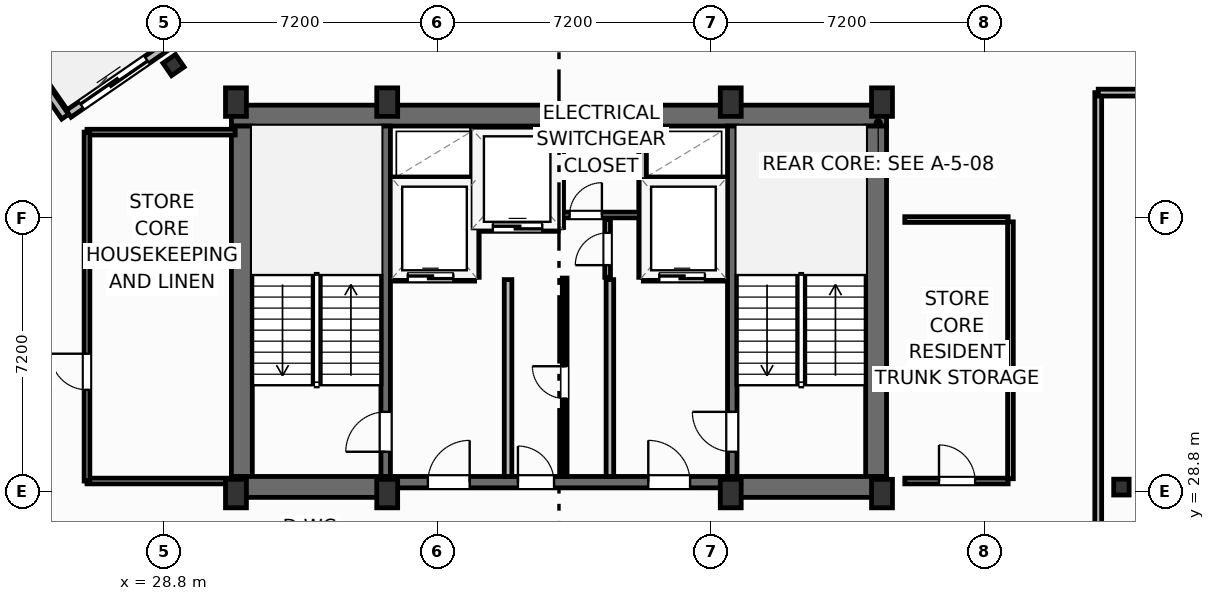
"""IFC4 building model, lengths in metres.
Left out: names, types, materials, properties, quantities, classifications, styles, units other than length and angle.
Written with IfcOpenShell. Run it as: python <this file> out.ifc"""

import sys

from ifc_helpers import new_model, si_unit, direction, frame, frame_2d, origin, origin_2d, place, context, subcontext, project, spatial, rectangle, i_section, extrude, element, fill, save


model = new_model("IFC4")
c1 = context("Model", 3, precision=1e-05, world=origin(), true_north=direction((0.0, 1.0)))
c2 = subcontext(c1, "Body", "Model", "MODEL_VIEW")
j1 = project(units=[si_unit("LENGTHUNIT", "METRE"), si_unit("PLANEANGLEUNIT", "RADIAN")], contexts=[c1])
p1 = place(None, origin())
s1 = spatial("IfcSite", under=j1, at=p1, CompositionType="ELEMENT")
p2 = place(p1, origin())
s2 = spatial("IfcBuilding", under=s1, at=p2, CompositionType="ELEMENT")
p3 = place(p2, frame((0.0, 0.0, 265.6)))
s3 = spatial("IfcBuildingStorey", under=s2, at=p3, CompositionType="ELEMENT", Elevation=265.6)
for number, where, z_axis, x_axis in (
    (1, (30.7, 28.75, 0.0), (0.0, 0.0, 1.0), (1.0, 0.0, 0.0)),
    (2, (34.68, 28.75, 0.0), (0.0, 0.0, 1.0), (1.0, 0.0, 0.0)),
    (3, (43.72, 28.75, 0.0), (0.0, 0.0, 1.0), (1.0, 0.0, 0.0)),
    (4, (47.7, 28.75, 0.0), (0.0, 0.0, 1.0), (1.0, 0.0, 0.0)),
    (5, (30.7, 39.05, 0.0), (0.0, 0.0, 1.0), (1.0, 0.0, 0.0)),
    (6, (34.68, 39.05, 0.0), (0.0, 0.0, 1.0), (1.0, 0.0, 0.0)),
    (7, (43.72, 39.05, 0.0), (0.0, 0.0, 1.0), (1.0, 0.0, 0.0)),
    (8, (47.7, 39.05, 0.0), (0.0, 0.0, 1.0), (1.0, 0.0, 0.0)),
):
    element("IfcColumn", number, at=place(p3, frame(where, z_axis=z_axis, x_axis=x_axis)), inside=s3, PredefinedType="COLUMN", context=c2, shape_type="SweptSolid", body=[
        extrude(rectangle(XDim=0.55, YDim=0.75, at=origin_2d()), origin(), (0.0, 0.0, 1.0), 3.7),
    ])
p4 = place(p3, frame((54.0, 28.92, 0.0), z_axis=(0.0, 0.0, 1.0), x_axis=(1.0, 0.0, 0.0)))
e9 = element("IfcColumn", 9, at=p4, inside=s3, PredefinedType="COLUMN", context=c2, shape_type="SweptSolid", body=[
    extrude(i_section(OverallWidth=0.406, OverallDepth=0.416, WebThickness=0.03, FlangeThickness=0.048, FilletRadius=0.025, at=origin_2d()), origin(), (0.0, 0.0, 1.0), 3.7),
])
p5 = place(p3, frame((30.58, 38.695, 0.0), z_axis=(0.0, 0.0, 1.0), x_axis=(1.0, 0.0, 0.0)))
e10 = element("IfcWall", 10, at=p5, inside=s3, PredefinedType="SHEAR", context=c2, shape_type="SweptSolid", body=[
    extrude(rectangle(XDim=17.24, YDim=0.55, at=frame_2d((8.62, 0.0))), origin(), (0.0, 0.0, 1.0), 3.45),
])
for number, where, z_axis, x_axis in (
    (11, (30.855, 29.2, 0.0), (0.0, 0.0, 1.0), (0.0, 1.0, 0.0)),
    (12, (47.545, 29.2, 0.0), (0.0, 0.0, 1.0), (0.0, 1.0, 0.0)),
):
    element("IfcWall", number, at=place(p3, frame(where, z_axis=z_axis, x_axis=x_axis)), inside=s3, PredefinedType="SHEAR", context=c2, shape_type="SweptSolid", body=[
        extrude(rectangle(XDim=9.22, YDim=0.55, at=frame_2d((4.61, 0.0))), origin(), (0.0, 0.0, 1.0), 3.45),
    ])
for number, where, z_axis, x_axis in (
    (13, (30.58, 28.925, 0.0), (0.0, 0.0, 1.0), (1.0, 0.0, 0.0)),
    (14, (43.6, 28.925, 0.0), (0.0, 0.0, 1.0), (1.0, 0.0, 0.0)),
):
    element("IfcWall", number, at=place(p3, frame(where, z_axis=z_axis, x_axis=x_axis)), inside=s3, PredefinedType="SHEAR", context=c2, shape_type="SweptSolid", body=[
        extrude(rectangle(XDim=4.22, YDim=0.55, at=frame_2d((2.11, 0.0))), origin(), (0.0, 0.0, 1.0), 3.45),
    ])
p6 = place(p3, frame((34.8, 29.05, 0.0), z_axis=(0.0, 0.0, 1.0), x_axis=(1.0, 0.0, 0.0)))
e15 = element("IfcWall", 15, at=p6, inside=s3, PredefinedType="SHEAR", context=c2, shape_type="SweptSolid", body=[
    extrude(rectangle(XDim=8.8, YDim=0.3, at=frame_2d((4.4, 0.0))), origin(), (0.0, 0.0, 1.0), 3.45),
])
p7 = place(p6, frame((0.95, 0.0, 0.0)))
e16 = element("IfcOpeningElement", 16, at=p7, cuts=e15, PredefinedType="OPENING", context=c2, shape_type="SweptSolid", body=[
    extrude(rectangle(XDim=1.1, YDim=2.15, at=frame_2d((0.55, 1.075))), frame((0.0, 0.16, 0.0), z_axis=(0.0, -1.0, 0.0), x_axis=(1.0, 0.0, 0.0)), (0.0, 0.0, 1.0), 0.32),
])
p8 = place(p6, frame((6.75, 0.0, 0.0)))
e17 = element("IfcOpeningElement", 17, at=p8, cuts=e15, PredefinedType="OPENING", context=c2, shape_type="SweptSolid", body=[
    extrude(rectangle(XDim=1.1, YDim=2.15, at=frame_2d((0.55, 1.075))), frame((0.0, 0.16, 0.0), z_axis=(0.0, -1.0, 0.0), x_axis=(1.0, 0.0, 0.0)), (0.0, 0.0, 1.0), 0.32),
])
p9 = place(p6, frame((3.32, 0.0, 0.0)))
e18 = element("IfcOpeningElement", 18, at=p9, cuts=e15, PredefinedType="OPENING", context=c2, shape_type="SweptSolid", body=[
    extrude(rectangle(XDim=0.95, YDim=2.15, at=frame_2d((0.475, 1.075))), frame((0.0, 0.16, 0.0), z_axis=(0.0, -1.0, 0.0), x_axis=(1.0, 0.0, 0.0)), (0.0, 0.0, 1.0), 0.32),
])
p10 = place(p3, frame((34.64, 29.2, 0.0), z_axis=(0.0, 0.0, 1.0), x_axis=(0.0, 1.0, 0.0)))
e19 = element("IfcWall", 19, at=p10, inside=s3, PredefinedType="SHEAR", context=c2, shape_type="SweptSolid", body=[
    extrude(rectangle(XDim=9.22, YDim=0.25, at=frame_2d((4.61, 0.0))), origin(), (0.0, 0.0, 1.0), 3.45),
])
p11 = place(p10, frame((0.65, 0.0, 0.0)))
e20 = element("IfcOpeningElement", 20, at=p11, cuts=e19, PredefinedType="OPENING", context=c2, shape_type="SweptSolid", body=[
    extrude(rectangle(XDim=1.05, YDim=2.15, at=frame_2d((0.525, 1.075))), frame((0.0, 0.135, 0.0), z_axis=(0.0, -1.0, 0.0), x_axis=(1.0, 0.0, 0.0)), (0.0, 0.0, 1.0), 0.27),
])
p12 = place(p3, frame((43.76, 29.2, 0.0), z_axis=(0.0, 0.0, 1.0), x_axis=(0.0, 1.0, 0.0)))
e21 = element("IfcWall", 21, at=p12, inside=s3, PredefinedType="SHEAR", context=c2, shape_type="SweptSolid", body=[
    extrude(rectangle(XDim=9.22, YDim=0.25, at=frame_2d((4.61, 0.0))), origin(), (0.0, 0.0, 1.0), 3.45),
])
p13 = place(p12, frame((0.65, 0.0, 0.0)))
e22 = element("IfcOpeningElement", 22, at=p13, cuts=e21, PredefinedType="OPENING", context=c2, shape_type="SweptSolid", body=[
    extrude(rectangle(XDim=1.05, YDim=2.15, at=frame_2d((0.525, 1.075))), frame((0.0, 0.135, 0.0), z_axis=(0.0, -1.0, 0.0), x_axis=(1.0, 0.0, 0.0)), (0.0, 0.0, 1.0), 0.27),
])
p14 = place(p3, frame((29.057, 40.025, 0.0), z_axis=(0.0, 0.0, 1.0), x_axis=(0.823532597628, 0.567268949127, 0.0)))
e23 = element("IfcColumn", 23, at=p14, inside=s3, PredefinedType="COLUMN", context=c2, shape_type="SweptSolid", body=[
    extrude(i_section(OverallWidth=0.401, OverallDepth=0.399, WebThickness=0.025, FlangeThickness=0.04, FilletRadius=0.022, at=origin_2d()), origin(), (0.0, 0.0, 1.0), 3.7),
])
p15 = place(p3, frame((26.297, 38.743, 0.0), z_axis=(0.0, 0.0, 1.0), x_axis=(0.823534636215, 0.567265989598, 0.0)))
e24 = element("IfcWall", 24, at=p15, inside=s3, PredefinedType="SOLIDWALL", context=c2, shape_type="SweptSolid", body=[
    extrude(rectangle(XDim=6.0, YDim=0.22, at=frame_2d((3.0, 0.0))), origin(), (0.0, 0.0, 1.0), 2.73),
])
p16 = place(p15, frame((0.4, 0.0, 0.0)))
e25 = element("IfcOpeningElement", 25, at=p16, cuts=e24, PredefinedType="OPENING", context=c2, shape_type="SweptSolid", body=[
    extrude(rectangle(XDim=2.1, YDim=2.3, at=frame_2d((1.05, 1.15))), frame((0.0, 0.12, 0.0), z_axis=(0.0, -1.0, 0.0), x_axis=(1.0, 0.0, 0.0)), (0.0, 0.0, 1.0), 0.24),
])
p17 = place(p3, frame((26.204, 38.667, 0.0), z_axis=(0.0, 0.0, 1.0), x_axis=(-0.567219383419, 0.823566737474, 0.0)))
e26 = element("IfcWall", 26, at=p17, inside=s3, PredefinedType="SOLIDWALL", context=c2, shape_type="SweptSolid", body=[
    extrude(rectangle(XDim=2.1, YDim=0.22, at=frame_2d((1.05, 0.0))), origin(), (0.0, 0.0, 1.0), 2.73),
])
p18 = place(p3, frame((53.39, 19.24, 0.0), z_axis=(0.0, 0.0, 1.0), x_axis=(0.0, 1.0, 0.0)))
e27 = element("IfcWall", 27, at=p18, inside=s3, PredefinedType="PARTITIONING", context=c2, shape_type="SweptSolid", body=[
    extrude(rectangle(XDim=20.06, YDim=0.18, at=frame_2d((10.03, 0.0))), origin(), (0.0, 0.0, 1.0), 3.45),
])
p19 = place(p18, frame((7.7, 0.0, 0.0)))
e28 = element("IfcOpeningElement", 28, at=p19, cuts=e27, PredefinedType="OPENING", context=c2, shape_type="SweptSolid", body=[
    extrude(rectangle(XDim=0.95, YDim=2.05, at=frame_2d((0.475, 1.025))), frame((0.0, 0.1, 0.0), z_axis=(0.0, -1.0, 0.0), x_axis=(1.0, 0.0, 0.0)), (0.0, 0.0, 1.0), 0.2),
])
p20 = place(p3, frame((53.39, 39.3, 0.0), z_axis=(0.0, 0.0, 1.0), x_axis=(1.0, 0.0, 0.0)))
e29 = element("IfcWall", 29, at=p20, inside=s3, PredefinedType="PARTITIONING", context=c2, shape_type="SweptSolid", body=[
    extrude(rectangle(XDim=16.149, YDim=0.18, at=frame_2d((8.075, 0.0))), origin(), (0.0, 0.0, 1.0), 2.739),
])
for number, where, z_axis, x_axis in (
    (30, (37.86, 29.2, 0.0), (0.0, 0.0, 1.0), (0.0, 1.0, 0.0)),
    (31, (40.54, 29.2, 0.0), (0.0, 0.0, 1.0), (0.0, 1.0, 0.0)),
):
    element("IfcWall", number, at=place(p3, frame(where, z_axis=z_axis, x_axis=x_axis)), inside=s3, PredefinedType="PARTITIONING", context=c2, shape_type="SweptSolid", body=[
        extrude(rectangle(XDim=5.18, YDim=0.2, at=frame_2d((2.59, 0.0))), origin(), (0.0, 0.0, 1.0), 3.45),
    ])
p21 = place(p3, frame((34.8, 34.44, 0.0), z_axis=(0.0, 0.0, 1.0), x_axis=(1.0, 0.0, 0.0)))
e32 = element("IfcWall", 32, at=p21, inside=s3, PredefinedType="PARTITIONING", context=c2, shape_type="SweptSolid", body=[
    extrude(rectangle(XDim=2.18, YDim=0.2, at=frame_2d((1.09, 0.0))), origin(), (0.0, 0.0, 1.0), 3.45),
])
p22 = place(p21, frame((0.42, 0.0, 0.0)))
e33 = element("IfcOpeningElement", 33, at=p22, cuts=e32, PredefinedType="OPENING", context=c2, shape_type="SweptSolid", body=[
    extrude(rectangle(XDim=1.2, YDim=2.2, at=frame_2d((0.6, 1.1))), frame((0.0, 0.11, 0.0), z_axis=(0.0, -1.0, 0.0), x_axis=(1.0, 0.0, 0.0)), (0.0, 0.0, 1.0), 0.22),
])
p23 = place(p3, frame((34.8, 36.98, 0.0), z_axis=(0.0, 0.0, 1.0), x_axis=(1.0, 0.0, 0.0)))
e34 = element("IfcWall", 34, at=p23, inside=s3, PredefinedType="PARTITIONING", context=c2, shape_type="SweptSolid", body=[
    extrude(rectangle(XDim=2.18, YDim=0.2, at=frame_2d((1.09, 0.0))), origin(), (0.0, 0.0, 1.0), 3.45),
])
p24 = place(p3, frame((37.0, 34.44, 0.0), z_axis=(0.0, 0.0, 1.0), x_axis=(0.0, 1.0, 0.0)))
e35 = element("IfcWall", 35, at=p24, inside=s3, PredefinedType="PARTITIONING", context=c2, shape_type="SweptSolid", body=[
    extrude(rectangle(XDim=3.9, YDim=0.2, at=frame_2d((1.95, 0.0))), origin(), (0.0, 0.0, 1.0), 3.45),
])
p25 = place(p3, frame((41.42, 34.44, 0.0), z_axis=(0.0, 0.0, 1.0), x_axis=(1.0, 0.0, 0.0)))
e36 = element("IfcWall", 36, at=p25, inside=s3, PredefinedType="PARTITIONING", context=c2, shape_type="SweptSolid", body=[
    extrude(rectangle(XDim=2.18, YDim=0.2, at=frame_2d((1.09, 0.0))), origin(), (0.0, 0.0, 1.0), 3.45),
])
p26 = place(p25, frame((0.42, 0.0, 0.0)))
e37 = element("IfcOpeningElement", 37, at=p26, cuts=e36, PredefinedType="OPENING", context=c2, shape_type="SweptSolid", body=[
    extrude(rectangle(XDim=1.2, YDim=2.2, at=frame_2d((0.6, 1.1))), frame((0.0, 0.11, 0.0), z_axis=(0.0, -1.0, 0.0), x_axis=(1.0, 0.0, 0.0)), (0.0, 0.0, 1.0), 0.22),
])
p27 = place(p3, frame((41.42, 36.98, 0.0), z_axis=(0.0, 0.0, 1.0), x_axis=(1.0, 0.0, 0.0)))
e38 = element("IfcWall", 38, at=p27, inside=s3, PredefinedType="PARTITIONING", context=c2, shape_type="SweptSolid", body=[
    extrude(rectangle(XDim=2.18, YDim=0.2, at=frame_2d((1.09, 0.0))), origin(), (0.0, 0.0, 1.0), 3.45),
])
p28 = place(p3, frame((41.4, 34.44, 0.0), z_axis=(0.0, 0.0, 1.0), x_axis=(0.0, 1.0, 0.0)))
e39 = element("IfcWall", 39, at=p28, inside=s3, PredefinedType="PARTITIONING", context=c2, shape_type="SweptSolid", body=[
    extrude(rectangle(XDim=3.9, YDim=0.2, at=frame_2d((1.95, 0.0))), origin(), (0.0, 0.0, 1.0), 3.45),
])
p29 = place(p3, frame((37.06, 35.75, 0.0), z_axis=(0.0, 0.0, 1.0), x_axis=(1.0, 0.0, 0.0)))
e40 = element("IfcWall", 40, at=p29, inside=s3, PredefinedType="PARTITIONING", context=c2, shape_type="SweptSolid", body=[
    extrude(rectangle(XDim=2.12, YDim=0.2, at=frame_2d((1.06, 0.0))), origin(), (0.0, 0.0, 1.0), 3.45),
])
p30 = place(p29, frame((0.4, 0.0, 0.0)))
e41 = element("IfcOpeningElement", 41, at=p30, cuts=e40, PredefinedType="OPENING", context=c2, shape_type="SweptSolid", body=[
    extrude(rectangle(XDim=1.3, YDim=2.2, at=frame_2d((0.65, 1.1))), frame((0.0, 0.11, 0.0), z_axis=(0.0, -1.0, 0.0), x_axis=(1.0, 0.0, 0.0)), (0.0, 0.0, 1.0), 0.22),
])
p31 = place(p3, frame((39.22, 35.75, 0.0), z_axis=(0.0, 0.0, 1.0), x_axis=(0.0, 1.0, 0.0)))
e42 = element("IfcWall", 42, at=p31, inside=s3, PredefinedType="PARTITIONING", context=c2, shape_type="SweptSolid", body=[
    extrude(rectangle(XDim=2.59, YDim=0.2, at=frame_2d((1.295, 0.0))), origin(), (0.0, 0.0, 1.0), 3.45),
])
p32 = place(p3, frame((39.3, 36.08, 0.0), z_axis=(0.0, 0.0, 1.0), x_axis=(1.0, 0.0, 0.0)))
e43 = element("IfcWall", 43, at=p32, inside=s3, PredefinedType="PARTITIONING", context=c2, shape_type="SweptSolid", body=[
    extrude(rectangle(XDim=2.02, YDim=0.15, at=frame_2d((1.01, 0.0))), origin(), (0.0, 0.0, 1.0), 3.45),
])
p33 = place(p32, frame((0.18, 0.0, 0.0)))
e44 = element("IfcOpeningElement", 44, at=p33, cuts=e43, PredefinedType="OPENING", context=c2, shape_type="SweptSolid", body=[
    extrude(rectangle(XDim=0.85, YDim=2.05, at=frame_2d((0.425, 1.025))), frame((0.0, 0.085, 0.0), z_axis=(0.0, -1.0, 0.0), x_axis=(1.0, 0.0, 0.0)), (0.0, 0.0, 1.0), 0.17),
])
p34 = place(p3, frame((40.48, 34.44, 0.0), z_axis=(0.0, 0.0, 1.0), x_axis=(0.0, 1.0, 0.0)))
e45 = element("IfcWall", 45, at=p34, inside=s3, PredefinedType="PARTITIONING", context=c2, shape_type="SweptSolid", body=[
    extrude(rectangle(XDim=1.52, YDim=0.15, at=frame_2d((0.76, 0.0))), origin(), (0.0, 0.0, 1.0), 3.45),
])
p35 = place(p34, frame((0.32, 0.0, 0.0)))
e46 = element("IfcOpeningElement", 46, at=p35, cuts=e45, PredefinedType="OPENING", context=c2, shape_type="SweptSolid", body=[
    extrude(rectangle(XDim=0.85, YDim=2.05, at=frame_2d((0.425, 1.025))), frame((0.0, 0.085, 0.0), z_axis=(0.0, -1.0, 0.0), x_axis=(1.0, 0.0, 0.0)), (0.0, 0.0, 1.0), 0.17),
])
p36 = place(p3, frame((39.35, 29.2, 0.0), z_axis=(0.0, 0.0, 1.0), x_axis=(0.0, 1.0, 0.0)))
e47 = element("IfcWall", 47, at=p36, inside=s3, PredefinedType="PARTITIONING", context=c2, shape_type="SweptSolid", body=[
    extrude(rectangle(XDim=5.22, YDim=0.125, at=frame_2d((2.61, 0.0))), origin(), (0.0, 0.0, 1.0), 3.45),
])
p37 = place(p36, frame((2.05, 0.0, 0.0)))
e48 = element("IfcOpeningElement", 48, at=p37, cuts=e47, PredefinedType="OPENING", context=c2, shape_type="SweptSolid", body=[
    extrude(rectangle(XDim=0.85, YDim=2.05, at=frame_2d((0.425, 1.025))), frame((0.0, 0.073, 0.0), z_axis=(0.0, -1.0, 0.0), x_axis=(1.0, 0.0, 0.0)), (0.0, 0.0, 1.0), 0.145),
])
p38 = place(p3, frame((26.78, 29.08, 0.0), z_axis=(0.0, 0.0, 1.0), x_axis=(1.0, 0.0, 0.0)))
e49 = element("IfcWall", 49, at=p38, inside=s3, PredefinedType="PARTITIONING", context=c2, shape_type="SweptSolid", body=[
    extrude(rectangle(XDim=3.8, YDim=0.15, at=frame_2d((1.9, 0.0))), origin(), (0.0, 0.0, 1.0), 3.45),
])
p39 = place(p3, frame((26.78, 38.26, 0.0), z_axis=(0.0, 0.0, 1.0), x_axis=(1.0, 0.0, 0.0)))
e50 = element("IfcWall", 50, at=p39, inside=s3, PredefinedType="PARTITIONING", context=c2, shape_type="SweptSolid", body=[
    extrude(rectangle(XDim=3.9, YDim=0.15, at=frame_2d((1.95, 0.0))), origin(), (0.0, 0.0, 1.0), 3.45),
])
p40 = place(p3, frame((26.78, 29.08, 0.0), z_axis=(0.0, 0.0, 1.0), x_axis=(0.0, 1.0, 0.0)))
e51 = element("IfcWall", 51, at=p40, inside=s3, PredefinedType="PARTITIONING", context=c2, shape_type="SweptSolid", body=[
    extrude(rectangle(XDim=9.18, YDim=0.15, at=frame_2d((4.59, 0.0))), origin(), (0.0, 0.0, 1.0), 3.45),
])
p41 = place(p40, frame((2.4, 0.0, 0.0)))
e52 = element("IfcOpeningElement", 52, at=p41, cuts=e51, PredefinedType="OPENING", context=c2, shape_type="SweptSolid", body=[
    extrude(rectangle(XDim=0.95, YDim=2.05, at=frame_2d((0.475, 1.025))), frame((0.0, 0.085, 0.0), z_axis=(0.0, -1.0, 0.0), x_axis=(1.0, 0.0, 0.0)), (0.0, 0.0, 1.0), 0.17),
])
p42 = place(p3, frame((48.3, 29.08, 0.0), z_axis=(0.0, 0.0, 1.0), x_axis=(1.0, 0.0, 0.0)))
e53 = element("IfcWall", 53, at=p42, inside=s3, PredefinedType="PARTITIONING", context=c2, shape_type="SweptSolid", body=[
    extrude(rectangle(XDim=2.72, YDim=0.15, at=frame_2d((1.36, 0.0))), origin(), (0.0, 0.0, 1.0), 2.662),
])
p43 = place(p42, frame((0.9, 0.0, 0.0)))
e54 = element("IfcOpeningElement", 54, at=p43, cuts=e53, PredefinedType="OPENING", context=c2, shape_type="SweptSolid", body=[
    extrude(rectangle(XDim=0.95, YDim=2.05, at=frame_2d((0.475, 1.025))), frame((0.0, 0.085, 0.0), z_axis=(0.0, -1.0, 0.0), x_axis=(1.0, 0.0, 0.0)), (0.0, 0.0, 1.0), 0.17),
])
p44 = place(p3, frame((48.3, 35.96, 0.0), z_axis=(0.0, 0.0, 1.0), x_axis=(1.0, 0.0, 0.0)))
e55 = element("IfcWall", 55, at=p44, inside=s3, PredefinedType="PARTITIONING", context=c2, shape_type="SweptSolid", body=[
    extrude(rectangle(XDim=2.72, YDim=0.15, at=frame_2d((1.36, 0.0))), origin(), (0.0, 0.0, 1.0), 3.45),
])
p45 = place(p3, frame((51.08, 29.14, 0.0), z_axis=(0.0, 0.0, 1.0), x_axis=(0.0, 1.0, 0.0)))
e56 = element("IfcWall", 56, at=p45, inside=s3, PredefinedType="PARTITIONING", context=c2, shape_type="SweptSolid", body=[
    extrude(rectangle(XDim=6.76, YDim=0.15, at=frame_2d((3.38, 0.0))), origin(), (0.0, 0.0, 1.0), 3.45),
])
p46 = place(p16, origin())
e57 = element("IfcDoor", 57, at=p46, inside=s3, OperationType="SLIDING_TO_LEFT", PredefinedType="DOOR", context=c2, shape_type="SweptSolid", body=[
    extrude(rectangle(XDim=2.1, YDim=2.3, at=frame_2d((1.05, 1.15))), frame((0.0, 0.025, 0.0), z_axis=(0.0, -1.0, 0.0), x_axis=(1.0, 0.0, 0.0)), (0.0, 0.0, 1.0), 0.05),
])
fill(e25, e57)
p47 = place(p11, origin())
e58 = element("IfcDoor", 58, at=p47, inside=s3, OperationType="SINGLE_SWING_LEFT", PredefinedType="DOOR", context=c2, shape_type="SweptSolid", body=[
    extrude(rectangle(XDim=1.05, YDim=2.15, at=frame_2d((0.525, 1.075))), frame((0.0, 0.025, 0.0), z_axis=(0.0, -1.0, 0.0), x_axis=(1.0, 0.0, 0.0)), (0.0, 0.0, 1.0), 0.05),
])
fill(e20, e58)
p48 = place(p13, origin())
e59 = element("IfcDoor", 59, at=p48, inside=s3, OperationType="SINGLE_SWING_RIGHT", PredefinedType="DOOR", context=c2, shape_type="SweptSolid", body=[
    extrude(rectangle(XDim=1.05, YDim=2.15, at=frame_2d((0.525, 1.075))), frame((0.0, 0.025, 0.0), z_axis=(0.0, -1.0, 0.0), x_axis=(1.0, 0.0, 0.0)), (0.0, 0.0, 1.0), 0.05),
])
fill(e22, e59)
p49 = place(p7, origin())
e60 = element("IfcDoor", 60, at=p49, inside=s3, OperationType="SINGLE_SWING_RIGHT", PredefinedType="DOOR", context=c2, shape_type="SweptSolid", body=[
    extrude(rectangle(XDim=1.1, YDim=2.15, at=frame_2d((0.55, 1.075))), frame((0.0, 0.025, 0.0), z_axis=(0.0, -1.0, 0.0), x_axis=(1.0, 0.0, 0.0)), (0.0, 0.0, 1.0), 0.05),
])
fill(e16, e60)
p50 = place(p8, origin())
e61 = element("IfcDoor", 61, at=p50, inside=s3, OperationType="SINGLE_SWING_LEFT", PredefinedType="DOOR", context=c2, shape_type="SweptSolid", body=[
    extrude(rectangle(XDim=1.1, YDim=2.15, at=frame_2d((0.55, 1.075))), frame((0.0, 0.025, 0.0), z_axis=(0.0, -1.0, 0.0), x_axis=(1.0, 0.0, 0.0)), (0.0, 0.0, 1.0), 0.05),
])
fill(e17, e61)
p51 = place(p22, origin())
e62 = element("IfcDoor", 62, at=p51, inside=s3, OperationType="SLIDING_TO_LEFT", PredefinedType="DOOR", context=c2, shape_type="SweptSolid", body=[
    extrude(rectangle(XDim=1.2, YDim=2.2, at=frame_2d((0.6, 1.1))), frame((0.0, 0.025, 0.0), z_axis=(0.0, -1.0, 0.0), x_axis=(1.0, 0.0, 0.0)), (0.0, 0.0, 1.0), 0.05),
])
fill(e33, e62)
p52 = place(p26, origin())
e63 = element("IfcDoor", 63, at=p52, inside=s3, OperationType="SLIDING_TO_LEFT", PredefinedType="DOOR", context=c2, shape_type="SweptSolid", body=[
    extrude(rectangle(XDim=1.2, YDim=2.2, at=frame_2d((0.6, 1.1))), frame((0.0, 0.025, 0.0), z_axis=(0.0, -1.0, 0.0), x_axis=(1.0, 0.0, 0.0)), (0.0, 0.0, 1.0), 0.05),
])
fill(e37, e63)
p53 = place(p30, origin())
e64 = element("IfcDoor", 64, at=p53, inside=s3, OperationType="SLIDING_TO_LEFT", PredefinedType="DOOR", context=c2, shape_type="SweptSolid", body=[
    extrude(rectangle(XDim=1.3, YDim=2.2, at=frame_2d((0.65, 1.1))), frame((0.0, 0.025, 0.0), z_axis=(0.0, -1.0, 0.0), x_axis=(1.0, 0.0, 0.0)), (0.0, 0.0, 1.0), 0.05),
])
fill(e41, e64)
p54 = place(p33, origin())
e65 = element("IfcDoor", 65, at=p54, inside=s3, OperationType="SINGLE_SWING_RIGHT", PredefinedType="DOOR", context=c2, shape_type="SweptSolid", body=[
    extrude(rectangle(XDim=0.85, YDim=2.05, at=frame_2d((0.425, 1.025))), frame((0.0, 0.025, 0.0), z_axis=(0.0, -1.0, 0.0), x_axis=(1.0, 0.0, 0.0)), (0.0, 0.0, 1.0), 0.05),
])
fill(e44, e65)
p55 = place(p35, origin())
e66 = element("IfcDoor", 66, at=p55, inside=s3, OperationType="SINGLE_SWING_LEFT", PredefinedType="DOOR", context=c2, shape_type="SweptSolid", body=[
    extrude(rectangle(XDim=0.85, YDim=2.05, at=frame_2d((0.425, 1.025))), frame((0.0, 0.025, 0.0), z_axis=(0.0, -1.0, 0.0), x_axis=(1.0, 0.0, 0.0)), (0.0, 0.0, 1.0), 0.05),
])
fill(e46, e66)
p56 = place(p37, origin())
e67 = element("IfcDoor", 67, at=p56, inside=s3, OperationType="SINGLE_SWING_RIGHT", PredefinedType="DOOR", context=c2, shape_type="SweptSolid", body=[
    extrude(rectangle(XDim=0.85, YDim=2.05, at=frame_2d((0.425, 1.025))), frame((0.0, 0.025, 0.0), z_axis=(0.0, -1.0, 0.0), x_axis=(1.0, 0.0, 0.0)), (0.0, 0.0, 1.0), 0.05),
])
fill(e48, e67)
p57 = place(p9, origin())
e68 = element("IfcDoor", 68, at=p57, inside=s3, OperationType="SINGLE_SWING_LEFT", PredefinedType="DOOR", context=c2, shape_type="SweptSolid", body=[
    extrude(rectangle(XDim=0.95, YDim=2.15, at=frame_2d((0.475, 1.075))), frame((0.0, 0.025, 0.0), z_axis=(0.0, -1.0, 0.0), x_axis=(1.0, 0.0, 0.0)), (0.0, 0.0, 1.0), 0.05),
])
fill(e18, e68)
p58 = place(p41, origin())
e69 = element("IfcDoor", 69, at=p58, inside=s3, OperationType="SINGLE_SWING_RIGHT", PredefinedType="DOOR", context=c2, shape_type="SweptSolid", body=[
    extrude(rectangle(XDim=0.95, YDim=2.05, at=frame_2d((0.475, 1.025))), frame((0.0, 0.025, 0.0), z_axis=(0.0, -1.0, 0.0), x_axis=(1.0, 0.0, 0.0)), (0.0, 0.0, 1.0), 0.05),
])
fill(e52, e69)
p59 = place(p43, origin())
e70 = element("IfcDoor", 70, at=p59, inside=s3, OperationType="SINGLE_SWING_LEFT", PredefinedType="DOOR", context=c2, shape_type="SweptSolid", body=[
    extrude(rectangle(XDim=0.95, YDim=2.05, at=frame_2d((0.475, 1.025))), frame((0.0, 0.025, 0.0), z_axis=(0.0, -1.0, 0.0), x_axis=(1.0, 0.0, 0.0)), (0.0, 0.0, 1.0), 0.05),
])
fill(e54, e70)
save(model, sys.argv[1])
